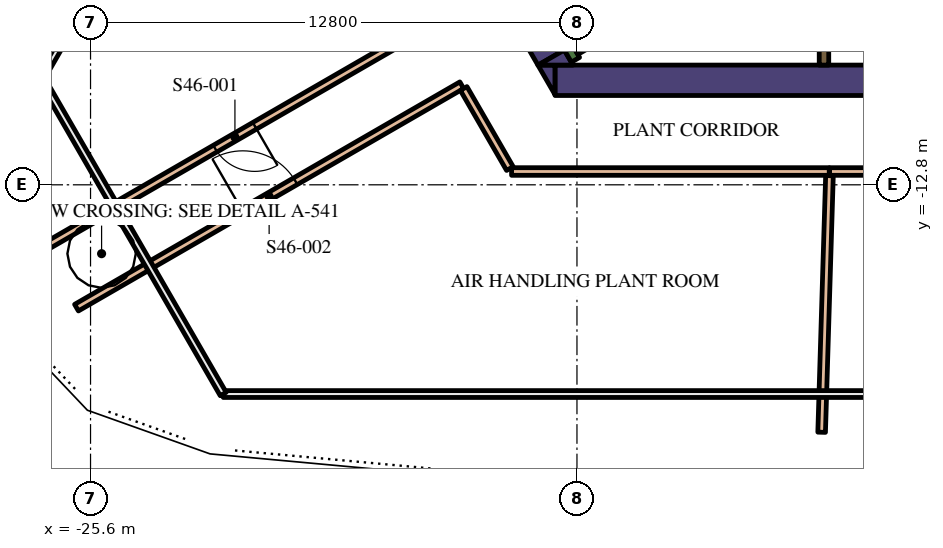
"""IFC4 building model, lengths in metres.
Left out: names, types, materials, properties, quantities, classifications, styles, units other than length and angle.
Written with IfcOpenShell. Run it as: python <this file> out.ifc"""

import sys

from ifc_helpers import new_model, si_unit, direction, frame, frame_2d, origin, place, context, subcontext, project, spatial, polyline, rectangle, outline, extrude, element, fill, save


model = new_model("IFC4")
c1 = context("Model", 3, precision=1e-05, world=origin(), true_north=direction((0.0, 1.0)))
c2 = subcontext(c1, "Body", "Model", "MODEL_VIEW")
j1 = project(units=[si_unit("LENGTHUNIT", "METRE"), si_unit("PLANEANGLEUNIT", "RADIAN")], contexts=[c1])
p1 = place(None, origin())
s1 = spatial("IfcSite", under=j1, at=p1, CompositionType="ELEMENT")
p2 = place(p1, origin())
s2 = spatial("IfcBuilding", under=s1, at=p2, CompositionType="ELEMENT")
p3 = place(p2, frame((0.0, 0.0, 196.2)))
s3 = spatial("IfcBuildingStorey", under=s2, at=p3, CompositionType="ELEMENT", Elevation=196.2)
p4 = place(p3, frame((-13.378, -10.05, 0.0), z_axis=(0.0, 0.0, 1.0), x_axis=(1.0, 0.0, 0.0)))
e1 = element("IfcWall", 1, at=p4, inside=s3, PredefinedType="SOLIDWALL", context=c2, shape_type="SweptSolid", body=[
    extrude(rectangle(XDim=22.282, YDim=0.8, at=frame_2d((11.141, 0.0))), origin(), (0.0, 0.0, 1.0), 5.4),
])
p5 = place(p3, origin())
e2 = element("IfcWall", 2, at=p5, inside=s3, PredefinedType="SOLIDWALL", context=c2, shape_type="SweptSolid", body=[
    extrude(outline(polyline([(-13.828, -9.65), (-13.38, -9.65), (-13.38, -10.426), (-13.828, -9.65)])), origin(), (0.0, 0.0, 1.0), 5.4),
])
p6 = place(p3, frame((-15.392, -6.14, 0.0), z_axis=(0.0, 0.0, 1.0), x_axis=(0.499984020225, -0.866034629516, 0.0)))
e3 = element("IfcWall", 3, at=p6, inside=s3, PredefinedType="SOLIDWALL", context=c2, shape_type="SweptSolid", body=[
    extrude(rectangle(XDim=3.824, YDim=0.8, at=frame_2d((1.912, 0.0))), origin(), (0.0, 0.0, 1.0), 5.4),
])
e4 = element("IfcWall", 4, at=p5, inside=s3, PredefinedType="SOLIDWALL", context=c2, shape_type="SweptSolid", body=[
    extrude(outline(polyline([(-12.904, -9.65), (-13.82, -9.65), (-13.133, -9.253), (-12.904, -9.65)])), origin(), (0.0, 0.0, 1.0), 5.4),
])
p7 = place(p3, frame((-12.84, -9.511, 0.0), z_axis=(0.0, 0.0, 1.0), x_axis=(-0.499997733992, 0.866026712061, 0.0)))
e5 = element("IfcWall", 5, at=p7, inside=s3, PredefinedType="SOLIDWALL", context=c2, shape_type="SweptSolid", body=[
    extrude(rectangle(XDim=3.634, YDim=0.25, at=frame_2d((1.817, 0.0))), origin(), (0.0, 0.0, 1.0), 5.4),
])
p8 = place(p3, frame((-12.84, -9.261, 0.0), z_axis=(0.0, 0.0, 1.0), x_axis=(0.866016039709, 0.500016218704, 0.0)))
e6 = element("IfcWall", 6, at=p8, inside=s3, PredefinedType="SOLIDWALL", context=c2, shape_type="SweptSolid", body=[
    extrude(rectangle(XDim=7.05, YDim=0.25, at=frame_2d((3.525, 0.0))), origin(), (0.0, 0.0, 1.0), 5.4),
])
p9 = place(p3, frame((-6.3, -8.925, 0.0), z_axis=(0.0, 0.0, 1.0), x_axis=(0.0, -1.0, 0.0)))
e7 = element("IfcWall", 7, at=p9, inside=s3, PredefinedType="SOLIDWALL", context=c2, shape_type="SweptSolid", body=[
    extrude(rectangle(XDim=0.725, YDim=0.25, at=frame_2d((0.363, 0.0))), origin(), (0.0, 0.0, 1.0), 5.4),
])
p10 = place(p3, frame((-6.152, -12.45, 0.0), z_axis=(0.0, 0.0, 1.0), x_axis=(1.0, 0.0, 0.0)))
e8 = element("IfcWall", 8, at=p10, inside=s3, PredefinedType="PARTITIONING", context=c2, shape_type="SweptSolid", body=[
    extrude(rectangle(XDim=12.305, YDim=0.2, at=frame_2d((6.152, 0.0))), origin(), (0.0, 0.0, 1.0), 4.65),
])
p11 = place(p10, frame((5.552, 0.0, 0.0)))
e9 = element("IfcOpeningElement", 9, at=p11, cuts=e8, PredefinedType="OPENING", context=c2, shape_type="SweptSolid", body=[
    extrude(rectangle(XDim=1.2, YDim=2.1, at=frame_2d((0.6, 1.05))), frame((0.0, 0.11, 0.0), z_axis=(0.0, -1.0, 0.0), x_axis=(1.0, 0.0, 0.0)), (0.0, 0.0, 1.0), 0.22),
])
p12 = place(p3, frame((-16.731, -8.621, 0.0), z_axis=(0.0, 0.0, 1.0), x_axis=(-0.866029647556, -0.4999926495, 0.0)))
e10 = element("IfcWall", 10, at=p12, inside=s3, PredefinedType="PARTITIONING", context=c2, shape_type="SweptSolid", body=[
    extrude(rectangle(XDim=11.706, YDim=0.2, at=frame_2d((5.853, 0.0))), origin(), (0.0, 0.0, 1.0), 4.65),
])
p13 = place(p12, frame((5.253, 0.0, 0.0)))
e11 = element("IfcOpeningElement", 11, at=p13, cuts=e10, PredefinedType="OPENING", context=c2, shape_type="SweptSolid", body=[
    extrude(rectangle(XDim=1.2, YDim=2.1, at=frame_2d((0.6, 1.05))), frame((0.0, 0.11, 0.0), z_axis=(0.0, -1.0, 0.0), x_axis=(1.0, 0.0, 0.0)), (0.0, 0.0, 1.0), 0.22),
])
p14 = place(p3, frame((-25.969, -16.032, 0.0), z_axis=(0.0, 0.0, 1.0), x_axis=(0.866024433663, 0.500001680296, 0.0)))
e12 = element("IfcWall", 12, at=p14, inside=s3, PredefinedType="PARTITIONING", context=c2, shape_type="SweptSolid", body=[
    extrude(rectangle(XDim=11.706, YDim=0.2, at=frame_2d((5.853, 0.0))), origin(), (0.0, 0.0, 1.0), 4.65),
])
p15 = place(p14, frame((5.053, 0.0, 0.0)))
e13 = element("IfcOpeningElement", 13, at=p15, cuts=e12, PredefinedType="OPENING", context=c2, shape_type="SweptSolid", body=[
    extrude(rectangle(XDim=1.6, YDim=2.1, at=frame_2d((0.8, 1.05))), frame((0.0, 0.11, 0.0), z_axis=(0.0, -1.0, 0.0), x_axis=(1.0, 0.0, 0.0)), (0.0, 0.0, 1.0), 0.22),
])
p16 = place(p3, frame((-6.162, -12.45, 0.0), z_axis=(0.0, 0.0, 1.0), x_axis=(-1.0, 0.0, 0.0)))
e14 = element("IfcWall", 14, at=p16, inside=s3, PredefinedType="PARTITIONING", context=c2, shape_type="SweptSolid", body=[
    extrude(rectangle(XDim=8.359, YDim=0.2, at=frame_2d((4.179, 0.0))), origin(), (0.0, 0.0, 1.0), 4.65),
])
p17 = place(p3, frame((-6.156, -12.56, 0.0), z_axis=(0.0, 0.0, 1.0), x_axis=(-0.030506894933, -0.999534556362, 0.0)))
e15 = element("IfcWall", 15, at=p17, inside=s3, PredefinedType="PARTITIONING", context=c2, shape_type="SweptSolid", body=[
    extrude(rectangle(XDim=6.754, YDim=0.2, at=frame_2d((3.377, 0.0))), origin(), (0.0, 0.0, 1.0), 4.65),
])
p18 = place(p3, frame((-14.565, -12.372, 0.0), z_axis=(0.0, 0.0, 1.0), x_axis=(-0.499983176524, 0.866035116605, 0.0)))
e16 = element("IfcWall", 16, at=p18, inside=s3, PredefinedType="PARTITIONING", context=c2, shape_type="SweptSolid", body=[
    extrude(rectangle(XDim=2.432, YDim=0.2, at=frame_2d((1.216, 0.0))), origin(), (0.0, 0.0, 1.0), 4.65),
])
p19 = place(p13, origin())
e17 = element("IfcDoor", 17, at=p19, inside=s3, OperationType="SINGLE_SWING_RIGHT", PredefinedType="DOOR", context=c2, shape_type="SweptSolid", body=[
    extrude(rectangle(XDim=1.2, YDim=2.1, at=frame_2d((0.6, 1.05))), frame((0.0, 0.025, 0.0), z_axis=(0.0, -1.0, 0.0), x_axis=(1.0, 0.0, 0.0)), (0.0, 0.0, 1.0), 0.05),
])
fill(e11, e17)
p20 = place(p15, origin())
e18 = element("IfcDoor", 18, at=p20, inside=s3, OperationType="DOUBLE_DOOR_SINGLE_SWING", PredefinedType="DOOR", context=c2, shape_type="SweptSolid", body=[
    extrude(rectangle(XDim=1.6, YDim=2.1, at=frame_2d((0.8, 1.05))), frame((0.0, 0.025, 0.0), z_axis=(0.0, -1.0, 0.0), x_axis=(1.0, 0.0, 0.0)), (0.0, 0.0, 1.0), 0.05),
])
fill(e13, e18)
save(model, sys.argv[1])
